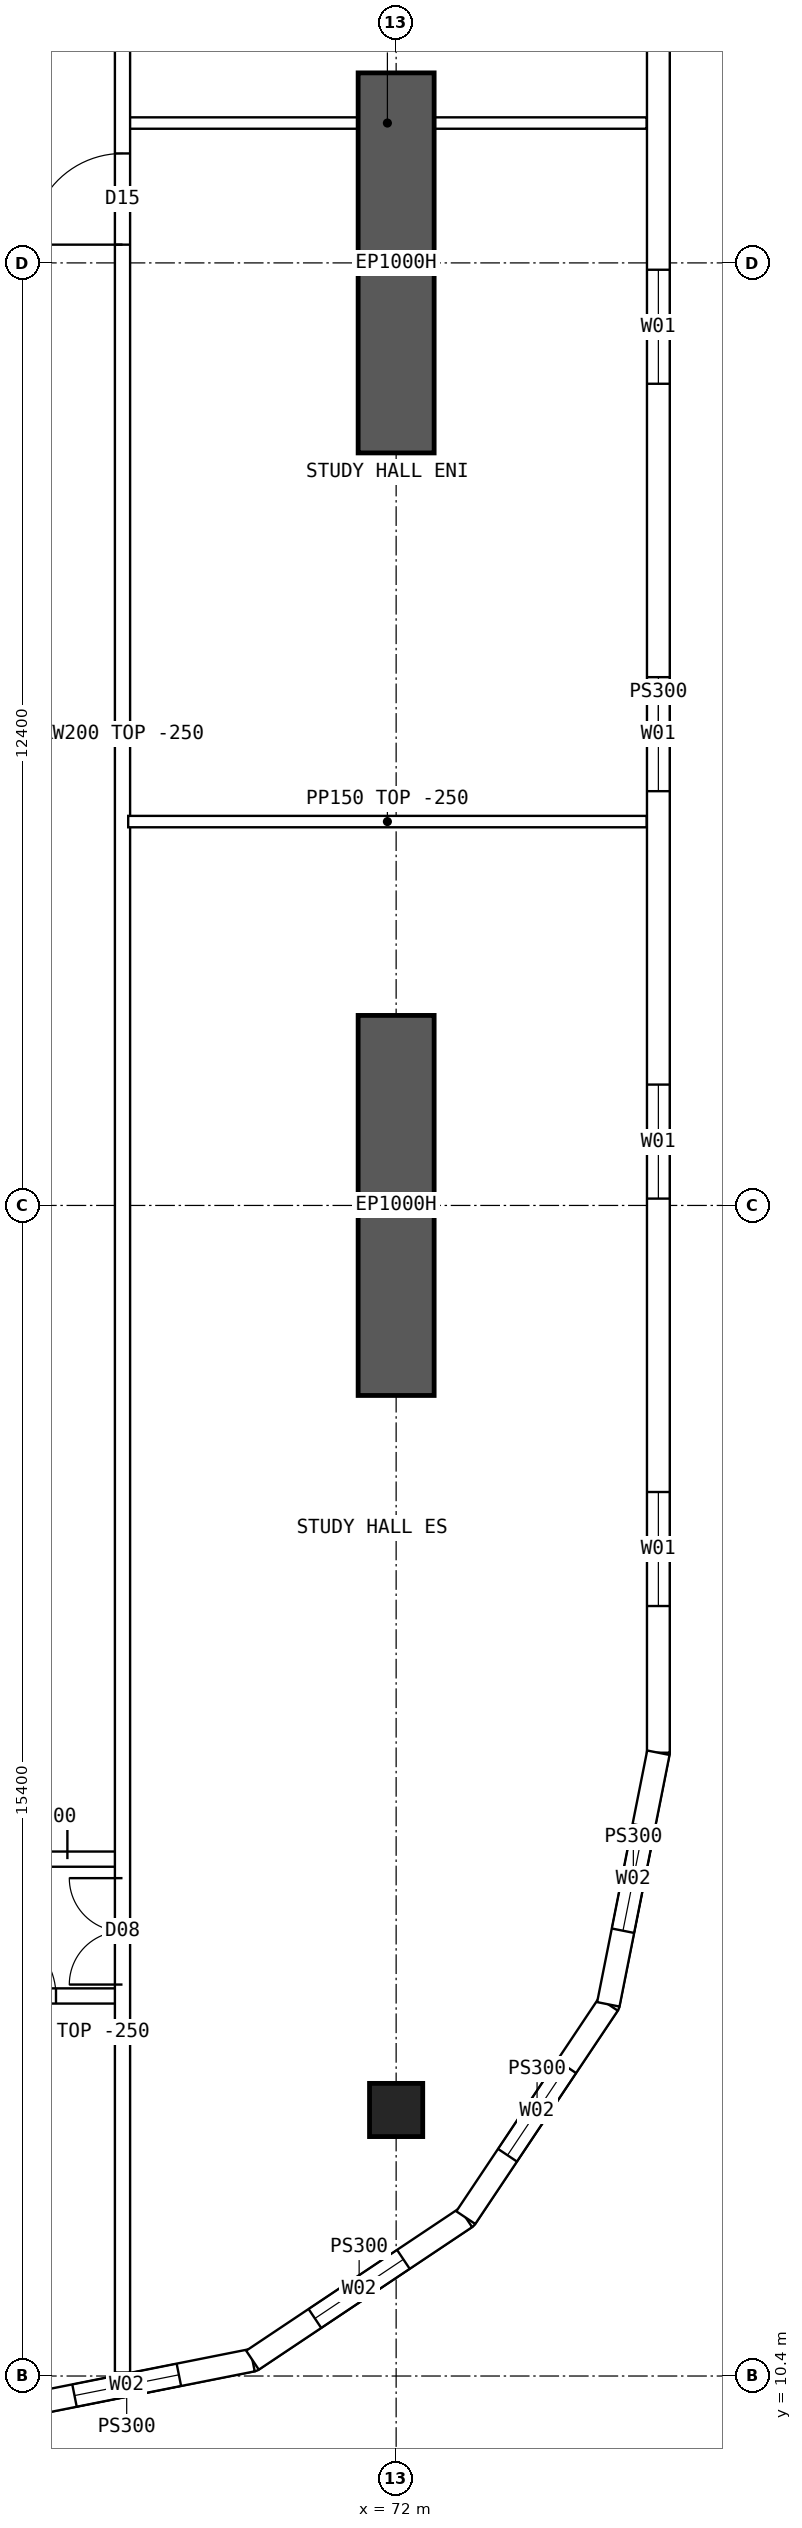
"""IFC4 building model, lengths in metres.
Left out: names, types, materials, properties, quantities, classifications, styles, units other than length and angle.
Written with IfcOpenShell. Run it as: python <this file> out.ifc"""

import sys

from ifc_helpers import new_model, si_unit, direction, frame, frame_2d, origin, origin_2d, place, context, subcontext, project, spatial, polyline, rectangle, hollow_rectangle, outline, extrude, element, fill, save


model = new_model("IFC4")
c1 = context("Model", 3, precision=1e-05, world=origin(), true_north=direction((0.0, 1.0)))
c2 = subcontext(c1, "Body", "Model", "MODEL_VIEW")
j1 = project(units=[si_unit("LENGTHUNIT", "METRE"), si_unit("PLANEANGLEUNIT", "RADIAN")], contexts=[c1])
p1 = place(None, origin())
s1 = spatial("IfcSite", under=j1, at=p1, CompositionType="ELEMENT")
p2 = place(p1, origin())
s2 = spatial("IfcBuilding", under=s1, at=p2, CompositionType="ELEMENT")
p3 = place(p2, frame((0.0, 0.0, 148.6)))
s3 = spatial("IfcBuildingStorey", under=s2, at=p3, CompositionType="ELEMENT", Elevation=148.6)
p4 = place(p3, frame((72.0, 13.9, 0.0), z_axis=(0.0, 0.0, 1.0), x_axis=(1.0, 0.0, 0.0)))
e1 = element("IfcColumn", 1, at=p4, inside=s3, PredefinedType="COLUMN", context=c2, shape_type="SweptSolid", body=[
    extrude(hollow_rectangle(XDim=0.7, YDim=0.7, WallThickness=0.07, at=origin_2d()), origin(), (0.0, 0.0, 1.0), 3.75),
])
for number, where, z_axis, x_axis in (
    (2, (72.0, 23.3, 0.0), (0.0, 0.0, 1.0), (0.0, 1.0, 0.0)),
    (3, (72.0, 35.7, 0.0), (0.0, 0.0, 1.0), (0.0, 1.0, 0.0)),
):
    element("IfcWall", number, at=place(p3, frame(where, z_axis=z_axis, x_axis=x_axis)), inside=s3, PredefinedType="SHEAR", context=c2, shape_type="SweptSolid", body=[
        extrude(rectangle(XDim=5.0, YDim=1.0, at=frame_2d((2.5, 0.0))), origin(), (0.0, 0.0, 1.0), 3.75),
    ])
p5 = place(p3, frame((75.45, 18.6, 0.0), z_axis=(0.0, 0.0, 1.0), x_axis=(0.0, 1.0, 0.0)))
e4 = element("IfcWall", 4, at=p5, inside=s3, PredefinedType="SOLIDWALL", context=c2, shape_type="SweptSolid", body=[
    extrude(outline(polyline([(-0.015, -0.15), (26.815, -0.15), (26.785, 0.15), (0.015, 0.15), (-0.015, -0.15)])), origin(), (0.0, 0.0, 1.0), 3.5),
])
p6 = place(p5, frame((1.93, 0.0, 0.9)))
e5 = element("IfcOpeningElement", 5, at=p6, cuts=e4, PredefinedType="OPENING", context=c2, shape_type="SweptSolid", body=[
    extrude(rectangle(XDim=1.5, YDim=2.0, at=frame_2d((0.75, 1.0))), frame((0.0, 0.16, 0.0), z_axis=(0.0, -1.0, 0.0), x_axis=(1.0, 0.0, 0.0)), (0.0, 0.0, 1.0), 0.32),
])
p7 = place(p5, frame((7.29, 0.0, 0.9)))
e6 = element("IfcOpeningElement", 6, at=p7, cuts=e4, PredefinedType="OPENING", context=c2, shape_type="SweptSolid", body=[
    extrude(rectangle(XDim=1.5, YDim=2.0, at=frame_2d((0.75, 1.0))), frame((0.0, 0.16, 0.0), z_axis=(0.0, -1.0, 0.0), x_axis=(1.0, 0.0, 0.0)), (0.0, 0.0, 1.0), 0.32),
])
p8 = place(p5, frame((12.65, 0.0, 0.9)))
e7 = element("IfcOpeningElement", 7, at=p8, cuts=e4, PredefinedType="OPENING", context=c2, shape_type="SweptSolid", body=[
    extrude(rectangle(XDim=1.5, YDim=2.0, at=frame_2d((0.75, 1.0))), frame((0.0, 0.16, 0.0), z_axis=(0.0, -1.0, 0.0), x_axis=(1.0, 0.0, 0.0)), (0.0, 0.0, 1.0), 0.32),
])
p9 = place(p5, frame((18.01, 0.0, 0.9)))
e8 = element("IfcOpeningElement", 8, at=p9, cuts=e4, PredefinedType="OPENING", context=c2, shape_type="SweptSolid", body=[
    extrude(rectangle(XDim=1.5, YDim=2.0, at=frame_2d((0.75, 1.0))), frame((0.0, 0.16, 0.0), z_axis=(0.0, -1.0, 0.0), x_axis=(1.0, 0.0, 0.0)), (0.0, 0.0, 1.0), 0.32),
])
p10 = place(p5, frame((23.37, 0.0, 0.9)))
e9 = element("IfcOpeningElement", 9, at=p10, cuts=e4, PredefinedType="OPENING", context=c2, shape_type="SweptSolid", body=[
    extrude(rectangle(XDim=1.5, YDim=2.0, at=frame_2d((0.75, 1.0))), frame((0.0, 0.16, 0.0), z_axis=(0.0, -1.0, 0.0), x_axis=(1.0, 0.0, 0.0)), (0.0, 0.0, 1.0), 0.32),
])
p11 = place(p3, frame((66.8, 9.95, 0.0), z_axis=(0.0, 0.0, 1.0), x_axis=(0.98078325777, 0.195100490205, 0.0)))
e10 = element("IfcWall", 10, at=p11, inside=s3, PredefinedType="SOLIDWALL", context=c2, shape_type="SweptSolid", body=[
    extrude(outline(polyline([(-0.03, -0.15), (3.405, -0.15), (3.345, 0.15), (0.03, 0.15), (-0.03, -0.15)])), origin(), (0.0, 0.0, 1.0), 3.5),
])
p12 = place(p11, frame((0.988, 0.0, 0.9)))
e11 = element("IfcOpeningElement", 11, at=p12, cuts=e10, PredefinedType="OPENING", context=c2, shape_type="SweptSolid", body=[
    extrude(rectangle(XDim=1.4, YDim=1.8, at=frame_2d((0.7, 0.9))), frame((0.0, 0.16, 0.0), z_axis=(0.0, -1.0, 0.0), x_axis=(1.0, 0.0, 0.0)), (0.0, 0.0, 1.0), 0.32),
])
p13 = place(p3, frame((70.11, 10.608, 0.0), z_axis=(0.0, 0.0, 1.0), x_axis=(0.831493450887, 0.555534554399, 0.0)))
e12 = element("IfcWall", 12, at=p13, inside=s3, PredefinedType="SOLIDWALL", context=c2, shape_type="SweptSolid", body=[
    extrude(outline(polyline([(-0.03, -0.15), (3.405, -0.15), (3.345, 0.15), (0.03, 0.15), (-0.03, -0.15)])), origin(), (0.0, 0.0, 1.0), 3.5),
])
p14 = place(p13, frame((0.988, 0.0, 0.9)))
e13 = element("IfcOpeningElement", 13, at=p14, cuts=e12, PredefinedType="OPENING", context=c2, shape_type="SweptSolid", body=[
    extrude(rectangle(XDim=1.4, YDim=1.8, at=frame_2d((0.7, 0.9))), frame((0.0, 0.16, 0.0), z_axis=(0.0, -1.0, 0.0), x_axis=(1.0, 0.0, 0.0)), (0.0, 0.0, 1.0), 0.32),
])
p15 = place(p3, frame((72.917, 12.483, 0.0), z_axis=(0.0, 0.0, 1.0), x_axis=(0.555534554399, 0.831493450887, 0.0)))
e14 = element("IfcWall", 14, at=p15, inside=s3, PredefinedType="SOLIDWALL", context=c2, shape_type="SweptSolid", body=[
    extrude(outline(polyline([(-0.03, -0.15), (3.405, -0.15), (3.345, 0.15), (0.03, 0.15), (-0.03, -0.15)])), origin(), (0.0, 0.0, 1.0), 3.5),
])
p16 = place(p15, frame((0.988, 0.0, 0.9)))
e15 = element("IfcOpeningElement", 15, at=p16, cuts=e14, PredefinedType="OPENING", context=c2, shape_type="SweptSolid", body=[
    extrude(rectangle(XDim=1.4, YDim=1.8, at=frame_2d((0.7, 0.9))), frame((0.0, 0.16, 0.0), z_axis=(0.0, -1.0, 0.0), x_axis=(1.0, 0.0, 0.0)), (0.0, 0.0, 1.0), 0.32),
])
p17 = place(p3, frame((74.792, 15.29, 0.0), z_axis=(0.0, 0.0, 1.0), x_axis=(0.19508664885, 0.980786011034, 0.0)))
e16 = element("IfcWall", 16, at=p17, inside=s3, PredefinedType="SOLIDWALL", context=c2, shape_type="SweptSolid", body=[
    extrude(outline(polyline([(-0.03, -0.15), (3.39, -0.15), (3.36, 0.15), (0.03, 0.15), (-0.03, -0.15)])), origin(), (0.0, 0.0, 1.0), 3.5),
])
p18 = place(p17, frame((0.988, 0.0, 0.9)))
e17 = element("IfcOpeningElement", 17, at=p18, cuts=e16, PredefinedType="OPENING", context=c2, shape_type="SweptSolid", body=[
    extrude(rectangle(XDim=1.4, YDim=1.8, at=frame_2d((0.7, 0.9))), frame((0.0, 0.16, 0.0), z_axis=(0.0, -1.0, 0.0), x_axis=(1.0, 0.0, 0.0)), (0.0, 0.0, 1.0), 0.32),
])
p19 = place(p3, frame((66.425, 15.4, 0.0), z_axis=(0.0, 0.0, 1.0), x_axis=(1.0, 0.0, 0.0)))
e18 = element("IfcWall", 18, at=p19, inside=s3, PredefinedType="SOLIDWALL", context=c2, shape_type="SweptSolid", body=[
    extrude(rectangle(XDim=1.975, YDim=0.2, at=frame_2d((0.987, 0.0))), origin(), (0.0, 0.0, 1.0), 3.5),
])
p20 = place(p19, frame((0.2, 0.0, 0.0)))
e19 = element("IfcOpeningElement", 19, at=p20, cuts=e18, PredefinedType="OPENING", context=c2, shape_type="SweptSolid", body=[
    extrude(rectangle(XDim=0.9, YDim=2.1, at=frame_2d((0.45, 1.05))), frame((0.0, 0.11, 0.0), z_axis=(0.0, -1.0, 0.0), x_axis=(1.0, 0.0, 0.0)), (0.0, 0.0, 1.0), 0.22),
])
p21 = place(p3, frame((66.425, 17.2, 0.0), z_axis=(0.0, 0.0, 1.0), x_axis=(1.0, 0.0, 0.0)))
e20 = element("IfcWall", 20, at=p21, inside=s3, PredefinedType="SOLIDWALL", context=c2, shape_type="SweptSolid", body=[
    extrude(rectangle(XDim=1.975, YDim=0.2, at=frame_2d((0.987, 0.0))), origin(), (0.0, 0.0, 1.0), 3.5),
])
p22 = place(p21, frame((0.05, 0.0, 0.0)))
e21 = element("IfcOpeningElement", 21, at=p22, cuts=e20, PredefinedType="OPENING", context=c2, shape_type="SweptSolid", body=[
    extrude(rectangle(XDim=1.2, YDim=2.1, at=frame_2d((0.6, 1.05))), frame((0.0, 0.11, 0.0), z_axis=(0.0, -1.0, 0.0), x_axis=(1.0, 0.0, 0.0)), (0.0, 0.0, 1.0), 0.22),
])
p23 = place(p3, frame((68.475, 30.85, 0.0), z_axis=(0.0, 0.0, 1.0), x_axis=(1.0, 0.0, 0.0)))
e22 = element("IfcWall", 22, at=p23, inside=s3, PredefinedType="PARTITIONING", context=c2, shape_type="SweptSolid", body=[
    extrude(outline(polyline([(0.0, 0.0), (6.82, 0.0), (6.82, 3.5), (3.827, 3.5), (3.825, 3.05), (3.227, 3.05), (3.225, 3.5), (0.0, 3.5), (0.0, 0.0)])), frame((0.0, 0.075, 0.0), z_axis=(0.0, -1.0, 0.0), x_axis=(1.0, 0.0, 0.0)), (0.0, 0.0, 1.0), 0.15),
])
p24 = place(p3, frame((68.4, 10.446, 0.0), z_axis=(0.0, 0.0, 1.0), x_axis=(0.0, 1.0, 0.0)))
e23 = element("IfcWall", 23, at=p24, inside=s3, PredefinedType="SOLIDWALL", context=c2, shape_type="SweptSolid", body=[
    extrude(rectangle(XDim=43.107, YDim=0.2, at=frame_2d((21.554, 0.0))), origin(), (0.0, 0.0, 1.0), 3.5),
])
p25 = place(p24, frame((27.994, 0.0, 0.0)))
e24 = element("IfcOpeningElement", 24, at=p25, cuts=e23, PredefinedType="OPENING", context=c2, shape_type="SweptSolid", body=[
    extrude(rectangle(XDim=1.2, YDim=2.1, at=frame_2d((0.6, 1.05))), frame((0.0, 0.11, 0.0), z_axis=(0.0, -1.0, 0.0), x_axis=(1.0, 0.0, 0.0)), (0.0, 0.0, 1.0), 0.22),
])
p26 = place(p24, frame((5.104, 0.0, 0.0)))
e25 = element("IfcOpeningElement", 25, at=p26, cuts=e23, PredefinedType="OPENING", context=c2, shape_type="SweptSolid", body=[
    extrude(rectangle(XDim=1.4, YDim=2.1, at=frame_2d((0.7, 1.05))), frame((0.0, 0.11, 0.0), z_axis=(0.0, -1.0, 0.0), x_axis=(1.0, 0.0, 0.0)), (0.0, 0.0, 1.0), 0.22),
])
p27 = place(p24, frame((36.504, 0.0, 0.0)))
e26 = element("IfcOpeningElement", 26, at=p27, cuts=e23, PredefinedType="OPENING", context=c2, shape_type="SweptSolid", body=[
    extrude(rectangle(XDim=1.4, YDim=2.1, at=frame_2d((0.7, 1.05))), frame((0.0, 0.11, 0.0), z_axis=(0.0, -1.0, 0.0), x_axis=(1.0, 0.0, 0.0)), (0.0, 0.0, 1.0), 0.22),
])
p28 = place(p3, frame((68.475, 40.04, 0.0), z_axis=(0.0, 0.0, 1.0), x_axis=(1.0, 0.0, 0.0)))
e27 = element("IfcWall", 27, at=p28, inside=s3, PredefinedType="PARTITIONING", context=c2, shape_type="SweptSolid", body=[
    extrude(rectangle(XDim=6.82, YDim=0.15, at=frame_2d((3.41, 0.0))), origin(), (0.0, 0.0, 1.0), 3.5),
])
p29 = place(p6, origin())
e28 = element("IfcWindow", 28, at=p29, inside=s3, PartitioningType="SINGLE_PANEL", PredefinedType="WINDOW", context=c2, shape_type="SweptSolid", body=[
    extrude(rectangle(XDim=1.5, YDim=2.0, at=frame_2d((0.75, 1.0))), frame((0.0, 0.03, 0.0), z_axis=(0.0, -1.0, 0.0), x_axis=(1.0, 0.0, 0.0)), (0.0, 0.0, 1.0), 0.06),
])
fill(e5, e28)
p30 = place(p7, origin())
e29 = element("IfcWindow", 29, at=p30, inside=s3, PartitioningType="SINGLE_PANEL", PredefinedType="WINDOW", context=c2, shape_type="SweptSolid", body=[
    extrude(rectangle(XDim=1.5, YDim=2.0, at=frame_2d((0.75, 1.0))), frame((0.0, 0.03, 0.0), z_axis=(0.0, -1.0, 0.0), x_axis=(1.0, 0.0, 0.0)), (0.0, 0.0, 1.0), 0.06),
])
fill(e6, e29)
p31 = place(p8, origin())
e30 = element("IfcWindow", 30, at=p31, inside=s3, PartitioningType="SINGLE_PANEL", PredefinedType="WINDOW", context=c2, shape_type="SweptSolid", body=[
    extrude(rectangle(XDim=1.5, YDim=2.0, at=frame_2d((0.75, 1.0))), frame((0.0, 0.03, 0.0), z_axis=(0.0, -1.0, 0.0), x_axis=(1.0, 0.0, 0.0)), (0.0, 0.0, 1.0), 0.06),
])
fill(e7, e30)
p32 = place(p9, origin())
e31 = element("IfcWindow", 31, at=p32, inside=s3, PartitioningType="SINGLE_PANEL", PredefinedType="WINDOW", context=c2, shape_type="SweptSolid", body=[
    extrude(rectangle(XDim=1.5, YDim=2.0, at=frame_2d((0.75, 1.0))), frame((0.0, 0.03, 0.0), z_axis=(0.0, -1.0, 0.0), x_axis=(1.0, 0.0, 0.0)), (0.0, 0.0, 1.0), 0.06),
])
fill(e8, e31)
p33 = place(p12, origin())
e32 = element("IfcWindow", 32, at=p33, inside=s3, PartitioningType="SINGLE_PANEL", PredefinedType="WINDOW", context=c2, shape_type="SweptSolid", body=[
    extrude(rectangle(XDim=1.4, YDim=1.8, at=frame_2d((0.7, 0.9))), frame((0.0, 0.03, 0.0), z_axis=(0.0, -1.0, 0.0), x_axis=(1.0, 0.0, 0.0)), (0.0, 0.0, 1.0), 0.06),
])
fill(e11, e32)
p34 = place(p14, origin())
e33 = element("IfcWindow", 33, at=p34, inside=s3, PartitioningType="SINGLE_PANEL", PredefinedType="WINDOW", context=c2, shape_type="SweptSolid", body=[
    extrude(rectangle(XDim=1.4, YDim=1.8, at=frame_2d((0.7, 0.9))), frame((0.0, 0.03, 0.0), z_axis=(0.0, -1.0, 0.0), x_axis=(1.0, 0.0, 0.0)), (0.0, 0.0, 1.0), 0.06),
])
fill(e13, e33)
p35 = place(p16, origin())
e34 = element("IfcWindow", 34, at=p35, inside=s3, PartitioningType="SINGLE_PANEL", PredefinedType="WINDOW", context=c2, shape_type="SweptSolid", body=[
    extrude(rectangle(XDim=1.4, YDim=1.8, at=frame_2d((0.7, 0.9))), frame((0.0, 0.03, 0.0), z_axis=(0.0, -1.0, 0.0), x_axis=(1.0, 0.0, 0.0)), (0.0, 0.0, 1.0), 0.06),
])
fill(e15, e34)
p36 = place(p18, origin())
e35 = element("IfcWindow", 35, at=p36, inside=s3, PartitioningType="SINGLE_PANEL", PredefinedType="WINDOW", context=c2, shape_type="SweptSolid", body=[
    extrude(rectangle(XDim=1.4, YDim=1.8, at=frame_2d((0.7, 0.9))), frame((0.0, 0.03, 0.0), z_axis=(0.0, -1.0, 0.0), x_axis=(1.0, 0.0, 0.0)), (0.0, 0.0, 1.0), 0.06),
])
fill(e17, e35)
p37 = place(p22, origin())
e36 = element("IfcDoor", 36, at=p37, inside=s3, OperationType="DOUBLE_DOOR_SINGLE_SWING", PredefinedType="DOOR", context=c2, shape_type="SweptSolid", body=[
    extrude(rectangle(XDim=1.2, YDim=2.1, at=frame_2d((0.6, 1.05))), frame((0.0, 0.025, 0.0), z_axis=(0.0, -1.0, 0.0), x_axis=(1.0, 0.0, 0.0)), (0.0, 0.0, 1.0), 0.05),
])
fill(e21, e36)
p38 = place(p25, origin())
e37 = element("IfcDoor", 37, at=p38, inside=s3, OperationType="SINGLE_SWING_LEFT", PredefinedType="DOOR", context=c2, shape_type="SweptSolid", body=[
    extrude(rectangle(XDim=1.2, YDim=2.1, at=frame_2d((0.6, 1.05))), frame((0.0, 0.025, 0.0), z_axis=(0.0, -1.0, 0.0), x_axis=(1.0, 0.0, 0.0)), (0.0, 0.0, 1.0), 0.05),
])
fill(e24, e37)
p39 = place(p26, origin())
e38 = element("IfcDoor", 38, at=p39, inside=s3, OperationType="DOUBLE_DOOR_SINGLE_SWING", PredefinedType="DOOR", context=c2, shape_type="SweptSolid", body=[
    extrude(rectangle(XDim=1.4, YDim=2.1, at=frame_2d((0.7, 1.05))), frame((0.0, 0.025, 0.0), z_axis=(0.0, -1.0, 0.0), x_axis=(1.0, 0.0, 0.0)), (0.0, 0.0, 1.0), 0.05),
])
fill(e25, e38)
p40 = place(p20, origin())
e39 = element("IfcDoor", 39, at=p40, inside=s3, OperationType="SINGLE_SWING_LEFT", PredefinedType="DOOR", context=c2, shape_type="SweptSolid", body=[
    extrude(rectangle(XDim=0.9, YDim=2.1, at=frame_2d((0.45, 1.05))), frame((0.0, 0.025, 0.0), z_axis=(0.0, -1.0, 0.0), x_axis=(1.0, 0.0, 0.0)), (0.0, 0.0, 1.0), 0.05),
])
fill(e19, e39)
save(model, sys.argv[1])
